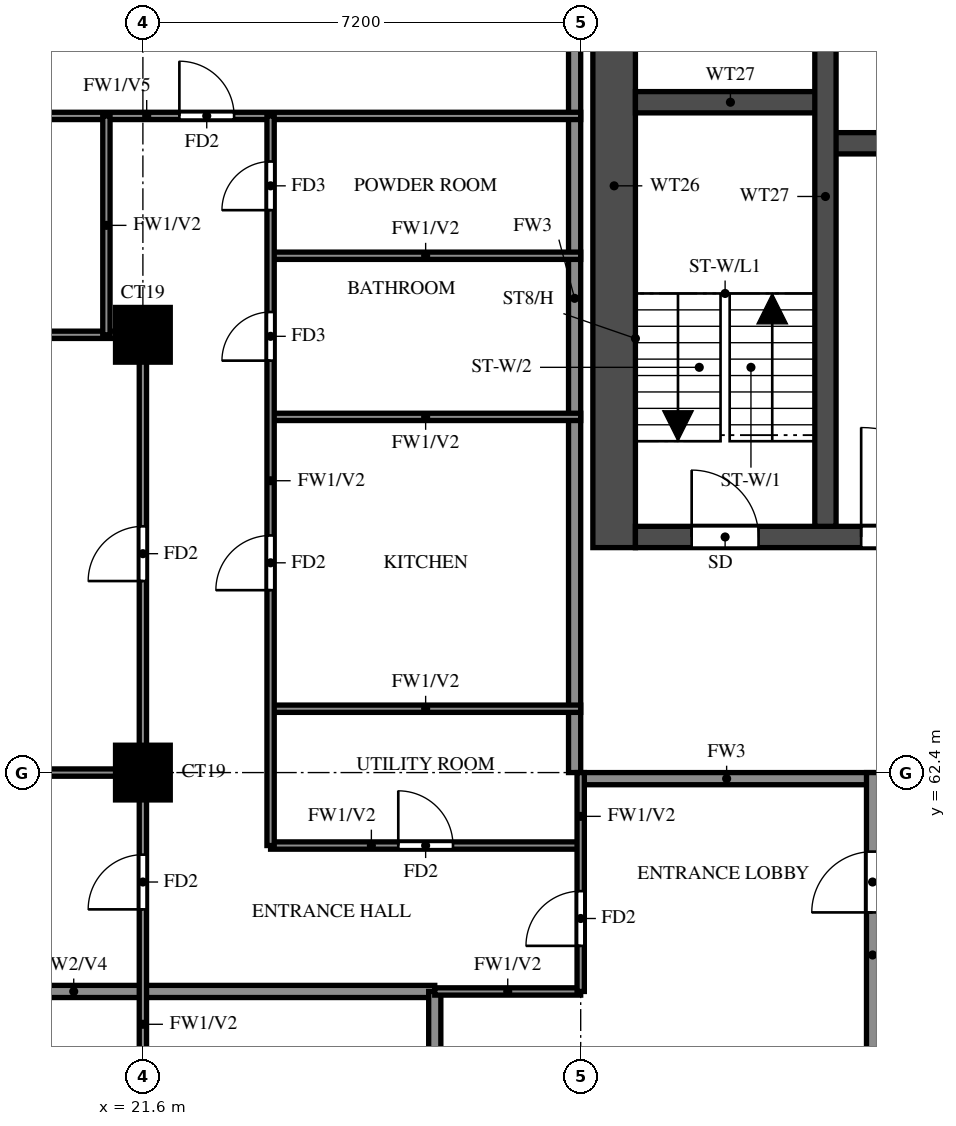
"""IFC4 building model, lengths in metres.
Left out: names, types, materials, properties, quantities, classifications, styles, units other than length and angle.
Written with IfcOpenShell. Run it as: python <this file> out.ifc"""

import sys

from ifc_helpers import new_model, si_unit, direction, frame, frame_2d, origin, origin_2d, place, context, subcontext, project, spatial, rectangle, extrude, source, transform, mapped, element, fill, save


model = new_model("IFC4")
c1 = context("Model", 3, precision=1e-05, world=origin(), true_north=direction((0.0, 1.0)))
c2 = subcontext(c1, "Body", "Model", "MODEL_VIEW")
j1 = project(units=[si_unit("LENGTHUNIT", "METRE"), si_unit("PLANEANGLEUNIT", "RADIAN")], contexts=[c1])
p1 = place(None, origin())
s1 = spatial("IfcSite", under=j1, at=p1, CompositionType="ELEMENT")
p2 = place(p1, origin())
s2 = spatial("IfcBuilding", under=s1, at=p2, CompositionType="ELEMENT")
p3 = place(p2, frame((0.0, 0.0, 178.0)))
s3 = spatial("IfcBuildingStorey", under=s2, at=p3, CompositionType="ELEMENT", Elevation=178.0)
m1 = source(origin(), c2, "Body", "SweptSolid", [
    extrude(rectangle(XDim=0.9, YDim=0.9, at=origin_2d()), origin(), (0.0, 0.0, 1.0), 3.2),
])
for number, where, z_axis, x_axis in (
    (1, (21.6, 62.4, 0.0), (0.0, 0.0, 1.0), (1.0, 0.0, 0.0)),
    (2, (21.6, 69.6, 0.0), (0.0, 0.0, 1.0), (1.0, 0.0, 0.0)),
):
    element("IfcColumn", number, at=place(p3, frame(where, z_axis=z_axis, x_axis=x_axis)), inside=s3, PredefinedType="COLUMN", context=c2, shape_type="MappedRepresentation", body=[
        mapped(m1, transform((0.0, 0.0, 0.0))),
    ])
p4 = place(p3, frame((29.35, 66.1, 0.0), z_axis=(0.0, 0.0, 1.0), x_axis=(0.0, 1.0, 0.0)))
e3 = element("IfcWall", 3, at=p4, inside=s3, PredefinedType="SHEAR", context=c2, shape_type="SweptSolid", body=[
    extrude(rectangle(XDim=11.9, YDim=0.7, at=frame_2d((5.95, 0.0))), origin(), (0.0, 0.0, 1.0), 3.2),
])
p5 = place(p3, frame((29.7, 66.275, 0.0), z_axis=(0.0, 0.0, 1.0), x_axis=(1.0, 0.0, 0.0)))
e4 = element("IfcWall", 4, at=p5, inside=s3, PredefinedType="SHEAR", context=c2, shape_type="SweptSolid", body=[
    extrude(rectangle(XDim=41.4, YDim=0.35, at=frame_2d((20.7, 0.0))), origin(), (0.0, 0.0, 1.0), 3.2),
])
p6 = place(p5, frame((0.925, 0.0, 0.0)))
e5 = element("IfcOpeningElement", 5, at=p6, cuts=e4, PredefinedType="OPENING", context=c2, shape_type="SweptSolid", body=[
    extrude(rectangle(XDim=1.1, YDim=2.1, at=frame_2d((0.55, 1.05))), frame((0.0, 0.185, 0.0), z_axis=(0.0, -1.0, 0.0), x_axis=(1.0, 0.0, 0.0)), (0.0, 0.0, 1.0), 0.37),
])
p7 = place(p5, frame((3.712, 0.0, 0.0)))
e6 = element("IfcOpeningElement", 6, at=p7, cuts=e4, PredefinedType="OPENING", context=c2, shape_type="SweptSolid", body=[
    extrude(rectangle(XDim=1.8, YDim=2.1, at=frame_2d((0.9, 1.05))), frame((0.0, 0.185, 0.0), z_axis=(0.0, -1.0, 0.0), x_axis=(1.0, 0.0, 0.0)), (0.0, 0.0, 1.0), 0.37),
])
p8 = place(p3, frame((32.825, 72.75, 0.0), z_axis=(0.0, 0.0, 1.0), x_axis=(1.0, 0.0, 0.0)))
e7 = element("IfcWall", 7, at=p8, inside=s3, PredefinedType="SHEAR", context=c2, shape_type="SweptSolid", body=[
    extrude(rectangle(XDim=35.15, YDim=0.35, at=frame_2d((17.575, 0.0))), origin(), (0.0, 0.0, 1.0), 3.2),
])
p9 = place(p8, frame((19.8, 0.0, 0.0)))
e8 = element("IfcOpeningElement", 8, at=p9, cuts=e7, PredefinedType="OPENING", context=c2, shape_type="SweptSolid", body=[
    extrude(rectangle(XDim=1.1, YDim=2.1, at=frame_2d((0.55, 1.05))), frame((0.0, 0.185, 0.0), z_axis=(0.0, -1.0, 0.0), x_axis=(1.0, 0.0, 0.0)), (0.0, 0.0, 1.0), 0.37),
])
p10 = place(p8, frame((27.7, 0.0, 0.0)))
e9 = element("IfcOpeningElement", 9, at=p10, cuts=e7, PredefinedType="OPENING", context=c2, shape_type="SweptSolid", body=[
    extrude(rectangle(XDim=1.1, YDim=2.1, at=frame_2d((0.55, 1.05))), frame((0.0, 0.185, 0.0), z_axis=(0.0, -1.0, 0.0), x_axis=(1.0, 0.0, 0.0)), (0.0, 0.0, 1.0), 0.37),
])
p11 = place(p8, frame((30.3, 0.0, 0.0)))
e10 = element("IfcOpeningElement", 10, at=p11, cuts=e7, PredefinedType="OPENING", context=c2, shape_type="SweptSolid", body=[
    extrude(rectangle(XDim=1.1, YDim=2.1, at=frame_2d((0.55, 1.05))), frame((0.0, 0.185, 0.0), z_axis=(0.0, -1.0, 0.0), x_axis=(1.0, 0.0, 0.0)), (0.0, 0.0, 1.0), 0.37),
])
p12 = place(p8, frame((3.8, 0.0, 0.0)))
e11 = element("IfcOpeningElement", 11, at=p12, cuts=e7, PredefinedType="OPENING", context=c2, shape_type="SweptSolid", body=[
    extrude(rectangle(XDim=1.1, YDim=2.1, at=frame_2d((0.55, 1.05))), frame((0.0, 0.185, 0.0), z_axis=(0.0, -1.0, 0.0), x_axis=(1.0, 0.0, 0.0)), (0.0, 0.0, 1.0), 0.37),
])
p13 = place(p8, frame((6.55, 0.0, 0.0)))
e12 = element("IfcOpeningElement", 12, at=p13, cuts=e7, PredefinedType="OPENING", context=c2, shape_type="SweptSolid", body=[
    extrude(rectangle(XDim=1.1, YDim=2.1, at=frame_2d((0.55, 1.05))), frame((0.0, 0.185, 0.0), z_axis=(0.0, -1.0, 0.0), x_axis=(1.0, 0.0, 0.0)), (0.0, 0.0, 1.0), 0.37),
])
p14 = place(p8, frame((9.3, 0.0, 0.0)))
e13 = element("IfcOpeningElement", 13, at=p14, cuts=e7, PredefinedType="OPENING", context=c2, shape_type="SweptSolid", body=[
    extrude(rectangle(XDim=1.1, YDim=2.1, at=frame_2d((0.55, 1.05))), frame((0.0, 0.185, 0.0), z_axis=(0.0, -1.0, 0.0), x_axis=(1.0, 0.0, 0.0)), (0.0, 0.0, 1.0), 0.37),
])
p15 = place(p8, frame((12.05, 0.0, 0.0)))
e14 = element("IfcOpeningElement", 14, at=p15, cuts=e7, PredefinedType="OPENING", context=c2, shape_type="SweptSolid", body=[
    extrude(rectangle(XDim=1.1, YDim=2.1, at=frame_2d((0.55, 1.05))), frame((0.0, 0.185, 0.0), z_axis=(0.0, -1.0, 0.0), x_axis=(1.0, 0.0, 0.0)), (0.0, 0.0, 1.0), 0.37),
])
p16 = place(p8, frame((14.8, 0.0, 0.0)))
e15 = element("IfcOpeningElement", 15, at=p16, cuts=e7, PredefinedType="OPENING", context=c2, shape_type="SweptSolid", body=[
    extrude(rectangle(XDim=1.1, YDim=2.1, at=frame_2d((0.55, 1.05))), frame((0.0, 0.185, 0.0), z_axis=(0.0, -1.0, 0.0), x_axis=(1.0, 0.0, 0.0)), (0.0, 0.0, 1.0), 0.37),
])
p17 = place(p8, frame((17.55, 0.0, 0.0)))
e16 = element("IfcOpeningElement", 16, at=p17, cuts=e7, PredefinedType="OPENING", context=c2, shape_type="SweptSolid", body=[
    extrude(rectangle(XDim=1.1, YDim=2.1, at=frame_2d((0.55, 1.05))), frame((0.0, 0.185, 0.0), z_axis=(0.0, -1.0, 0.0), x_axis=(1.0, 0.0, 0.0)), (0.0, 0.0, 1.0), 0.37),
])
p18 = place(p8, frame((0.938, 0.0, 0.0)))
e17 = element("IfcOpeningElement", 17, at=p18, cuts=e7, PredefinedType="OPENING", context=c2, shape_type="SweptSolid", body=[
    extrude(rectangle(XDim=1.1, YDim=2.1, at=frame_2d((0.55, 1.05))), frame((0.0, 0.185, 0.0), z_axis=(0.0, -1.0, 0.0), x_axis=(1.0, 0.0, 0.0)), (0.0, 0.0, 1.0), 0.37),
])
p19 = place(p3, frame((29.7, 73.425, 0.0), z_axis=(0.0, 0.0, 1.0), x_axis=(1.0, 0.0, 0.0)))
e18 = element("IfcWall", 18, at=p19, inside=s3, PredefinedType="SHEAR", context=c2, shape_type="SweptSolid", body=[
    extrude(rectangle(XDim=3.125, YDim=0.35, at=frame_2d((1.562, 0.0))), origin(), (0.0, 0.0, 1.0), 3.2),
])
p20 = place(p3, frame((32.825, 66.45, 0.0), z_axis=(0.0, 0.0, 1.0), x_axis=(0.0, 1.0, 0.0)))
e19 = element("IfcWall", 19, at=p20, inside=s3, PredefinedType="SHEAR", context=c2, shape_type="SweptSolid", body=[
    extrude(rectangle(XDim=10.85, YDim=0.35, at=frame_2d((5.425, 0.0))), origin(), (0.0, 0.0, 1.0), 3.2),
])
p21 = place(p3, frame((28.8, 62.3, 0.0), z_axis=(0.0, 0.0, 1.0), x_axis=(1.0, 0.0, 0.0)))
e20 = element("IfcWall", 20, at=p21, inside=s3, PredefinedType="SOLIDWALL", context=c2, shape_type="SweptSolid", body=[
    extrude(rectangle(XDim=4.8, YDim=0.2, at=frame_2d((2.4, 0.0))), origin(), (0.0, 0.0, 1.0), 3.2),
])
p22 = place(p3, frame((28.7, 62.4, 0.0), z_axis=(0.0, 0.0, 1.0), x_axis=(0.0, 1.0, 0.0)))
e21 = element("IfcWall", 21, at=p22, inside=s3, PredefinedType="SOLIDWALL", context=c2, shape_type="SweptSolid", body=[
    extrude(rectangle(XDim=15.6, YDim=0.2, at=frame_2d((7.8, 0.0))), origin(), (0.0, 0.0, 1.0), 3.2),
])
p23 = place(p3, frame((33.6, 56.4, 0.0), z_axis=(0.0, 0.0, 1.0), x_axis=(0.0, 1.0, 0.0)))
e22 = element("IfcWall", 22, at=p23, inside=s3, PredefinedType="SOLIDWALL", context=c2, shape_type="SweptSolid", body=[
    extrude(rectangle(XDim=6.0, YDim=0.2, at=frame_2d((3.0, 0.0))), origin(), (0.0, 0.0, 1.0), 3.2),
])
p24 = place(p23, frame((3.7, 0.0, 0.0)))
e23 = element("IfcOpeningElement", 23, at=p24, cuts=e22, PredefinedType="OPENING", context=c2, shape_type="SweptSolid", body=[
    extrude(rectangle(XDim=1.0, YDim=2.1, at=frame_2d((0.5, 1.05))), frame((0.0, 0.11, 0.0), z_axis=(0.0, -1.0, 0.0), x_axis=(1.0, 0.0, 0.0)), (0.0, 0.0, 1.0), 0.22),
])
p25 = place(p3, frame((14.525, 58.8, 0.0), z_axis=(0.0, 0.0, 1.0), x_axis=(1.0, 0.0, 0.0)))
e24 = element("IfcWall", 24, at=p25, inside=s3, PredefinedType="SOLIDWALL", context=c2, shape_type="SweptSolid", body=[
    extrude(rectangle(XDim=11.875, YDim=0.2, at=frame_2d((5.938, 0.0))), origin(), (0.0, 0.0, 1.0), 2.3),
])
p26 = place(p3, frame((26.4, 56.4, 0.0), z_axis=(0.0, 0.0, 1.0), x_axis=(0.0, 1.0, 0.0)))
e25 = element("IfcWall", 25, at=p26, inside=s3, PredefinedType="SOLIDWALL", context=c2, shape_type="SweptSolid", body=[
    extrude(rectangle(XDim=2.4, YDim=0.2, at=frame_2d((1.2, 0.0))), origin(), (0.0, 0.0, 1.0), 3.2),
])
p27 = place(p3, frame((26.4, 58.8, 0.0), z_axis=(0.0, 0.0, 1.0), x_axis=(1.0, 0.0, 0.0)))
e26 = element("IfcWall", 26, at=p27, inside=s3, PredefinedType="PARTITIONING", context=c2, shape_type="SweptSolid", body=[
    extrude(rectangle(XDim=2.4, YDim=0.12, at=frame_2d((1.2, 0.0))), origin(), (0.0, 0.0, 1.0), 3.2),
])
p28 = place(p3, frame((23.7, 61.2, 0.0), z_axis=(0.0, 0.0, 1.0), x_axis=(1.0, 0.0, 0.0)))
e27 = element("IfcWall", 27, at=p28, inside=s3, PredefinedType="PARTITIONING", context=c2, shape_type="SweptSolid", body=[
    extrude(rectangle(XDim=5.1, YDim=0.12, at=frame_2d((2.55, 0.0))), origin(), (0.0, 0.0, 1.0), 3.2),
])
p29 = place(p28, frame((2.1, 0.0, 0.0)))
e28 = element("IfcOpeningElement", 28, at=p29, cuts=e27, PredefinedType="OPENING", context=c2, shape_type="SweptSolid", body=[
    extrude(rectangle(XDim=0.9, YDim=2.1, at=frame_2d((0.45, 1.05))), frame((0.0, 0.07, 0.0), z_axis=(0.0, -1.0, 0.0), x_axis=(1.0, 0.0, 0.0)), (0.0, 0.0, 1.0), 0.14),
])
p30 = place(p3, frame((14.525, 62.4, 0.0), z_axis=(0.0, 0.0, 1.0), x_axis=(1.0, 0.0, 0.0)))
e29 = element("IfcWall", 29, at=p30, inside=s3, PredefinedType="PARTITIONING", context=c2, shape_type="SweptSolid", body=[
    extrude(rectangle(XDim=7.075, YDim=0.12, at=frame_2d((3.538, 0.0))), origin(), (0.0, 0.0, 1.0), 3.2),
])
for number, where, z_axis, x_axis in (
    (30, (23.7, 63.45, 0.0), (0.0, 0.0, 1.0), (1.0, 0.0, 0.0)),
    (31, (23.7, 68.25, 0.0), (0.0, 0.0, 1.0), (1.0, 0.0, 0.0)),
):
    element("IfcWall", number, at=place(p3, frame(where, z_axis=z_axis, x_axis=x_axis)), inside=s3, PredefinedType="PARTITIONING", context=c2, shape_type="SweptSolid", body=[
        extrude(rectangle(XDim=5.1, YDim=0.12, at=frame_2d((2.55, 0.0))), origin(), (0.0, 0.0, 1.0), 3.2),
    ])
p31 = place(p3, frame((14.525, 69.6, 0.0), z_axis=(0.0, 0.0, 1.0), x_axis=(1.0, 0.0, 0.0)))
e32 = element("IfcWall", 32, at=p31, inside=s3, PredefinedType="PARTITIONING", context=c2, shape_type="SweptSolid", body=[
    extrude(rectangle(XDim=7.075, YDim=0.12, at=frame_2d((3.538, 0.0))), origin(), (0.0, 0.0, 1.0), 3.2),
])
p32 = place(p31, frame((2.837, 0.0, 0.0)))
e33 = element("IfcOpeningElement", 33, at=p32, cuts=e32, PredefinedType="OPENING", context=c2, shape_type="SweptSolid", body=[
    extrude(rectangle(XDim=0.8, YDim=2.1, at=frame_2d((0.4, 1.05))), frame((0.0, 0.07, 0.0), z_axis=(0.0, -1.0, 0.0), x_axis=(1.0, 0.0, 0.0)), (0.0, 0.0, 1.0), 0.14),
])
p33 = place(p3, frame((23.7, 70.9, 0.0), z_axis=(0.0, 0.0, 1.0), x_axis=(1.0, 0.0, 0.0)))
e34 = element("IfcWall", 34, at=p33, inside=s3, PredefinedType="PARTITIONING", context=c2, shape_type="SweptSolid", body=[
    extrude(rectangle(XDim=5.1, YDim=0.12, at=frame_2d((2.55, 0.0))), origin(), (0.0, 0.0, 1.0), 3.2),
])
p34 = place(p3, frame((14.525, 73.2, 0.0), z_axis=(0.0, 0.0, 1.0), x_axis=(1.0, 0.0, 0.0)))
e35 = element("IfcWall", 35, at=p34, inside=s3, PredefinedType="PARTITIONING", context=c2, shape_type="SweptSolid", body=[
    extrude(rectangle(XDim=14.275, YDim=0.12, at=frame_2d((7.138, 0.0))), origin(), (0.0, 0.0, 1.0), 2.3),
])
p35 = place(p34, frame((7.675, 0.0, 0.0)))
e36 = element("IfcOpeningElement", 36, at=p35, cuts=e35, PredefinedType="OPENING", context=c2, shape_type="SweptSolid", body=[
    extrude(rectangle(XDim=0.9, YDim=2.1, at=frame_2d((0.45, 1.05))), frame((0.0, 0.07, 0.0), z_axis=(0.0, -1.0, 0.0), x_axis=(1.0, 0.0, 0.0)), (0.0, 0.0, 1.0), 0.14),
])
p36 = place(p3, frame((21.0, 69.6, 0.0), z_axis=(0.0, 0.0, 1.0), x_axis=(0.0, 1.0, 0.0)))
e37 = element("IfcWall", 37, at=p36, inside=s3, PredefinedType="PARTITIONING", context=c2, shape_type="SweptSolid", body=[
    extrude(rectangle(XDim=3.6, YDim=0.12, at=frame_2d((1.8, 0.0))), origin(), (0.0, 0.0, 1.0), 3.2),
])
p37 = place(p3, frame((21.6, 48.0, 0.0), z_axis=(0.0, 0.0, 1.0), x_axis=(0.0, 1.0, 0.0)))
e38 = element("IfcWall", 38, at=p37, inside=s3, PredefinedType="PARTITIONING", context=c2, shape_type="SweptSolid", body=[
    extrude(rectangle(XDim=21.6, YDim=0.12, at=frame_2d((10.8, 0.0))), origin(), (0.0, 0.0, 1.0), 3.2),
])
p38 = place(p37, frame((1.35, 0.0, 0.0)))
e39 = element("IfcOpeningElement", 39, at=p38, cuts=e38, PredefinedType="OPENING", context=c2, shape_type="SweptSolid", body=[
    extrude(rectangle(XDim=0.9, YDim=2.1, at=frame_2d((0.45, 1.05))), frame((0.0, 0.07, 0.0), z_axis=(0.0, -1.0, 0.0), x_axis=(1.0, 0.0, 0.0)), (0.0, 0.0, 1.0), 0.14),
])
p39 = place(p37, frame((7.95, 0.0, 0.0)))
e40 = element("IfcOpeningElement", 40, at=p39, cuts=e38, PredefinedType="OPENING", context=c2, shape_type="SweptSolid", body=[
    extrude(rectangle(XDim=1.5, YDim=2.1, at=frame_2d((0.75, 1.05))), frame((0.0, 0.07, 0.0), z_axis=(0.0, -1.0, 0.0), x_axis=(1.0, 0.0, 0.0)), (0.0, 0.0, 1.0), 0.14),
])
p40 = place(p37, frame((12.15, 0.0, 0.0)))
e41 = element("IfcOpeningElement", 41, at=p40, cuts=e38, PredefinedType="OPENING", context=c2, shape_type="SweptSolid", body=[
    extrude(rectangle(XDim=0.9, YDim=2.1, at=frame_2d((0.45, 1.05))), frame((0.0, 0.07, 0.0), z_axis=(0.0, -1.0, 0.0), x_axis=(1.0, 0.0, 0.0)), (0.0, 0.0, 1.0), 0.14),
])
p41 = place(p37, frame((17.55, 0.0, 0.0)))
e42 = element("IfcOpeningElement", 42, at=p41, cuts=e38, PredefinedType="OPENING", context=c2, shape_type="SweptSolid", body=[
    extrude(rectangle(XDim=0.9, YDim=2.1, at=frame_2d((0.45, 1.05))), frame((0.0, 0.07, 0.0), z_axis=(0.0, -1.0, 0.0), x_axis=(1.0, 0.0, 0.0)), (0.0, 0.0, 1.0), 0.14),
])
p42 = place(p3, frame((23.7, 61.2, 0.0), z_axis=(0.0, 0.0, 1.0), x_axis=(0.0, 1.0, 0.0)))
e43 = element("IfcWall", 43, at=p42, inside=s3, PredefinedType="PARTITIONING", context=c2, shape_type="SweptSolid", body=[
    extrude(rectangle(XDim=12.0, YDim=0.12, at=frame_2d((6.0, 0.0))), origin(), (0.0, 0.0, 1.0), 3.2),
])
p43 = place(p42, frame((4.2, 0.0, 0.0)))
e44 = element("IfcOpeningElement", 44, at=p43, cuts=e43, PredefinedType="OPENING", context=c2, shape_type="SweptSolid", body=[
    extrude(rectangle(XDim=0.9, YDim=2.1, at=frame_2d((0.45, 1.05))), frame((0.0, 0.07, 0.0), z_axis=(0.0, -1.0, 0.0), x_axis=(1.0, 0.0, 0.0)), (0.0, 0.0, 1.0), 0.14),
])
p44 = place(p42, frame((7.975, 0.0, 0.0)))
e45 = element("IfcOpeningElement", 45, at=p44, cuts=e43, PredefinedType="OPENING", context=c2, shape_type="SweptSolid", body=[
    extrude(rectangle(XDim=0.8, YDim=2.1, at=frame_2d((0.4, 1.05))), frame((0.0, 0.07, 0.0), z_axis=(0.0, -1.0, 0.0), x_axis=(1.0, 0.0, 0.0)), (0.0, 0.0, 1.0), 0.14),
])
p45 = place(p42, frame((10.45, 0.0, 0.0)))
e46 = element("IfcOpeningElement", 46, at=p45, cuts=e43, PredefinedType="OPENING", context=c2, shape_type="SweptSolid", body=[
    extrude(rectangle(XDim=0.8, YDim=2.1, at=frame_2d((0.4, 1.05))), frame((0.0, 0.07, 0.0), z_axis=(0.0, -1.0, 0.0), x_axis=(1.0, 0.0, 0.0)), (0.0, 0.0, 1.0), 0.14),
])
p46 = place(p3, frame((28.8, 58.8, 0.0), z_axis=(0.0, 0.0, 1.0), x_axis=(0.0, 1.0, 0.0)))
e47 = element("IfcWall", 47, at=p46, inside=s3, PredefinedType="PARTITIONING", context=c2, shape_type="SweptSolid", body=[
    extrude(rectangle(XDim=3.6, YDim=0.12, at=frame_2d((1.8, 0.0))), origin(), (0.0, 0.0, 1.0), 3.2),
])
p47 = place(p46, frame((0.75, 0.0, 0.0)))
e48 = element("IfcOpeningElement", 48, at=p47, cuts=e47, PredefinedType="OPENING", context=c2, shape_type="SweptSolid", body=[
    extrude(rectangle(XDim=0.9, YDim=2.1, at=frame_2d((0.45, 1.05))), frame((0.0, 0.07, 0.0), z_axis=(0.0, -1.0, 0.0), x_axis=(1.0, 0.0, 0.0)), (0.0, 0.0, 1.0), 0.14),
])
p48 = place(p6, origin())
e49 = element("IfcDoor", 49, at=p48, inside=s3, OperationType="SINGLE_SWING_LEFT", PredefinedType="DOOR", context=c2, shape_type="SweptSolid", body=[
    extrude(rectangle(XDim=1.1, YDim=2.1, at=frame_2d((0.55, 1.05))), frame((0.0, 0.025, 0.0), z_axis=(0.0, -1.0, 0.0), x_axis=(1.0, 0.0, 0.0)), (0.0, 0.0, 1.0), 0.05),
])
fill(e5, e49)
p49 = place(p7, origin())
e50 = element("IfcDoor", 50, at=p49, inside=s3, OperationType="DOUBLE_DOOR_SINGLE_SWING", PredefinedType="DOOR", context=c2, shape_type="SweptSolid", body=[
    extrude(rectangle(XDim=1.8, YDim=2.1, at=frame_2d((0.9, 1.05))), frame((0.0, 0.025, 0.0), z_axis=(0.0, -1.0, 0.0), x_axis=(1.0, 0.0, 0.0)), (0.0, 0.0, 1.0), 0.05),
])
fill(e6, e50)
p50 = place(p47, origin())
e51 = element("IfcDoor", 51, at=p50, inside=s3, OperationType="SINGLE_SWING_RIGHT", PredefinedType="DOOR", context=c2, shape_type="SweptSolid", body=[
    extrude(rectangle(XDim=0.9, YDim=2.1, at=frame_2d((0.45, 1.05))), frame((0.0, 0.025, 0.0), z_axis=(0.0, -1.0, 0.0), x_axis=(1.0, 0.0, 0.0)), (0.0, 0.0, 1.0), 0.05),
])
fill(e48, e51)
p51 = place(p24, origin())
e52 = element("IfcDoor", 52, at=p51, inside=s3, OperationType="SINGLE_SWING_LEFT", PredefinedType="DOOR", context=c2, shape_type="SweptSolid", body=[
    extrude(rectangle(XDim=1.0, YDim=2.1, at=frame_2d((0.5, 1.05))), frame((0.0, 0.025, 0.0), z_axis=(0.0, -1.0, 0.0), x_axis=(1.0, 0.0, 0.0)), (0.0, 0.0, 1.0), 0.05),
])
fill(e23, e52)
p52 = place(p40, origin())
e53 = element("IfcDoor", 53, at=p52, inside=s3, OperationType="SINGLE_SWING_LEFT", PredefinedType="DOOR", context=c2, shape_type="SweptSolid", body=[
    extrude(rectangle(XDim=0.9, YDim=2.1, at=frame_2d((0.45, 1.05))), frame((0.0, 0.025, 0.0), z_axis=(0.0, -1.0, 0.0), x_axis=(1.0, 0.0, 0.0)), (0.0, 0.0, 1.0), 0.05),
])
fill(e41, e53)
p53 = place(p41, origin())
e54 = element("IfcDoor", 54, at=p53, inside=s3, OperationType="SINGLE_SWING_RIGHT", PredefinedType="DOOR", context=c2, shape_type="SweptSolid", body=[
    extrude(rectangle(XDim=0.9, YDim=2.1, at=frame_2d((0.45, 1.05))), frame((0.0, 0.025, 0.0), z_axis=(0.0, -1.0, 0.0), x_axis=(1.0, 0.0, 0.0)), (0.0, 0.0, 1.0), 0.05),
])
fill(e42, e54)
p54 = place(p35, origin())
e55 = element("IfcDoor", 55, at=p54, inside=s3, OperationType="SINGLE_SWING_LEFT", PredefinedType="DOOR", context=c2, shape_type="SweptSolid", body=[
    extrude(rectangle(XDim=0.9, YDim=2.1, at=frame_2d((0.45, 1.05))), frame((0.0, 0.025, 0.0), z_axis=(0.0, -1.0, 0.0), x_axis=(1.0, 0.0, 0.0)), (0.0, 0.0, 1.0), 0.05),
])
fill(e36, e55)
p55 = place(p29, origin())
e56 = element("IfcDoor", 56, at=p55, inside=s3, OperationType="SINGLE_SWING_RIGHT", PredefinedType="DOOR", context=c2, shape_type="SweptSolid", body=[
    extrude(rectangle(XDim=0.9, YDim=2.1, at=frame_2d((0.45, 1.05))), frame((0.0, 0.025, 0.0), z_axis=(0.0, -1.0, 0.0), x_axis=(1.0, 0.0, 0.0)), (0.0, 0.0, 1.0), 0.05),
])
fill(e28, e56)
p56 = place(p43, origin())
e57 = element("IfcDoor", 57, at=p56, inside=s3, OperationType="SINGLE_SWING_LEFT", PredefinedType="DOOR", context=c2, shape_type="SweptSolid", body=[
    extrude(rectangle(XDim=0.9, YDim=2.1, at=frame_2d((0.45, 1.05))), frame((0.0, 0.025, 0.0), z_axis=(0.0, -1.0, 0.0), x_axis=(1.0, 0.0, 0.0)), (0.0, 0.0, 1.0), 0.05),
])
fill(e44, e57)
p57 = place(p44, origin())
e58 = element("IfcDoor", 58, at=p57, inside=s3, OperationType="SINGLE_SWING_LEFT", PredefinedType="DOOR", context=c2, shape_type="SweptSolid", body=[
    extrude(rectangle(XDim=0.8, YDim=2.1, at=frame_2d((0.4, 1.05))), frame((0.0, 0.025, 0.0), z_axis=(0.0, -1.0, 0.0), x_axis=(1.0, 0.0, 0.0)), (0.0, 0.0, 1.0), 0.05),
])
fill(e45, e58)
p58 = place(p45, origin())
e59 = element("IfcDoor", 59, at=p58, inside=s3, OperationType="SINGLE_SWING_RIGHT", PredefinedType="DOOR", context=c2, shape_type="SweptSolid", body=[
    extrude(rectangle(XDim=0.8, YDim=2.1, at=frame_2d((0.4, 1.05))), frame((0.0, 0.025, 0.0), z_axis=(0.0, -1.0, 0.0), x_axis=(1.0, 0.0, 0.0)), (0.0, 0.0, 1.0), 0.05),
])
fill(e46, e59)
save(model, sys.argv[1])
